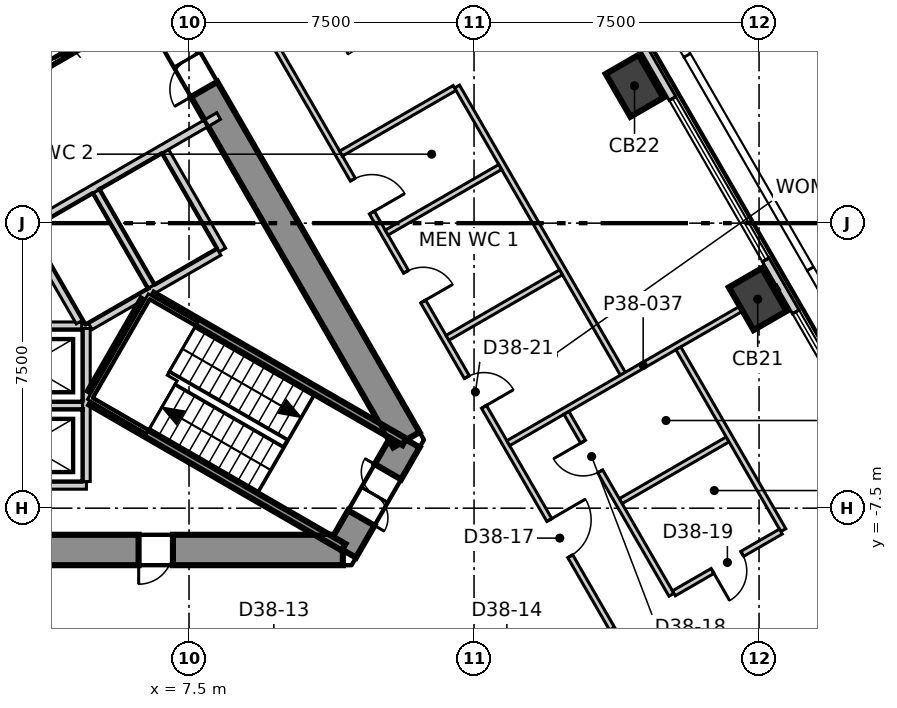
"""IFC4 building model, lengths in metres.
Left out: names, types, materials, properties, quantities, classifications, styles, units other than length and angle.
Written with IfcOpenShell. Run it as: python <this file> out.ifc"""

import sys

from ifc_helpers import new_model, si_unit, direction, frame, frame_2d, origin, origin_2d, place, context, subcontext, project, spatial, polyline, rectangle, outline, extrude, element, fill, save


model = new_model("IFC4")
c1 = context("Model", 3, precision=1e-05, world=origin(), true_north=direction((0.0, 1.0)))
c2 = subcontext(c1, "Body", "Model", "MODEL_VIEW")
j1 = project(units=[si_unit("LENGTHUNIT", "METRE"), si_unit("PLANEANGLEUNIT", "RADIAN")], contexts=[c1])
p1 = place(None, origin())
s1 = spatial("IfcSite", under=j1, at=p1, CompositionType="ELEMENT")
p2 = place(p1, origin())
s2 = spatial("IfcBuilding", under=s1, at=p2, CompositionType="ELEMENT")
p3 = place(p2, frame((0.0, 0.0, 164.3)))
s3 = spatial("IfcBuildingStorey", under=s2, at=p3, CompositionType="ELEMENT", Elevation=164.3)
p4 = place(p3, frame((-11.547, -8.6, -0.3), z_axis=(0.0, 0.0, 1.0), x_axis=(1.0, 0.0, 0.0)))
e1 = element("IfcWall", 1, at=p4, inside=s3, PredefinedType="SHEAR", context=c2, shape_type="SweptSolid", body=[
    extrude(outline(polyline([(-0.231, -0.4), (1.732, -0.4), (3.695, -0.4), (5.658, -0.4), (7.621, -0.4), (9.584, -0.4), (11.547, -0.4), (13.51, -0.4), (15.473, -0.4), (17.436, -0.4), (19.399, -0.4), (21.362, -0.4), (23.325, -0.4), (22.863, 0.4), (20.977, 0.4), (19.091, 0.4), (17.205, 0.4), (15.319, 0.4), (13.433, 0.4), (11.547, 0.4), (9.661, 0.4), (7.775, 0.4), (5.889, 0.4), (4.003, 0.4), (2.117, 0.4), (0.231, 0.4), (-0.231, -0.4)])), origin(), (0.0, 0.0, 1.0), 4.0),
])
p5 = place(p4, frame((3.34, 0.0, 0.3)))
e2 = element("IfcOpeningElement", 2, at=p5, cuts=e1, PredefinedType="OPENING", context=c2, shape_type="SweptSolid", body=[
    extrude(rectangle(XDim=0.9, YDim=2.1, at=frame_2d((0.45, 1.05))), frame((0.0, 0.41, 0.0), z_axis=(0.0, -1.0, 0.0), x_axis=(1.0, 0.0, 0.0)), (0.0, 0.0, 1.0), 0.82),
])
p6 = place(p4, frame((17.722, 0.0, 0.3)))
e3 = element("IfcOpeningElement", 3, at=p6, cuts=e1, PredefinedType="OPENING", context=c2, shape_type="SweptSolid", body=[
    extrude(rectangle(XDim=0.9, YDim=2.1, at=frame_2d((0.45, 1.05))), frame((0.0, 0.41, 0.0), z_axis=(0.0, -1.0, 0.0), x_axis=(1.0, 0.0, 0.0)), (0.0, 0.0, 1.0), 0.82),
])
p7 = place(p3, frame((11.547, -8.6, -0.3), z_axis=(0.0, 0.0, 1.0), x_axis=(0.49987182685, 0.866099391942, 0.0)))
e4 = element("IfcWall", 4, at=p7, inside=s3, PredefinedType="SHEAR", context=c2, shape_type="SweptSolid", body=[
    extrude(outline(polyline([(-0.231, -0.4), (1.674, -0.4), (3.579, -0.4), (3.118, 0.4), (1.674, 0.4), (0.231, 0.4), (-0.231, -0.4)])), origin(), (0.0, 0.0, 1.0), 4.0),
])
p8 = place(p7, frame((0.974, 0.0, 0.3)))
e5 = element("IfcOpeningElement", 5, at=p8, cuts=e4, PredefinedType="OPENING", context=c2, shape_type="SweptSolid", body=[
    extrude(rectangle(XDim=1.4, YDim=2.1, at=frame_2d((0.7, 1.05))), frame((0.0, 0.41, 0.0), z_axis=(0.0, -1.0, 0.0), x_axis=(1.0, 0.0, 0.0)), (0.0, 0.0, 1.0), 0.82),
])
p9 = place(p3, frame((13.221, -5.7, -0.3), z_axis=(0.0, 0.0, 1.0), x_axis=(-0.499995765644, 0.866027848477, 0.0)))
e6 = element("IfcWall", 6, at=p9, inside=s3, PredefinedType="SHEAR", context=c2, shape_type="SweptSolid", body=[
    extrude(outline(polyline([(-0.231, -0.4), (1.732, -0.4), (3.695, -0.4), (5.658, -0.4), (7.621, -0.4), (9.584, -0.4), (11.547, -0.4), (13.51, -0.4), (15.473, -0.4), (17.436, -0.4), (19.399, -0.4), (21.362, -0.4), (23.325, -0.4), (22.863, 0.4), (20.977, 0.4), (19.091, 0.4), (17.205, 0.4), (15.319, 0.4), (13.433, 0.4), (11.547, 0.4), (9.661, 0.4), (7.775, 0.4), (5.889, 0.4), (4.003, 0.4), (2.117, 0.4), (0.231, 0.4), (-0.231, -0.4)])), origin(), (0.0, 0.0, 1.0), 4.0),
])
p10 = place(p9, frame((10.647, 0.0, 0.3)))
e7 = element("IfcOpeningElement", 7, at=p10, cuts=e6, PredefinedType="OPENING", context=c2, shape_type="SweptSolid", body=[
    extrude(rectangle(XDim=1.8, YDim=2.1, at=frame_2d((0.9, 1.05))), frame((0.0, 0.41, 0.0), z_axis=(0.0, -1.0, 0.0), x_axis=(1.0, 0.0, 0.0)), (0.0, 0.0, 1.0), 0.82),
])
p11 = place(p9, frame((17.671, 0.0, 0.3)))
e8 = element("IfcOpeningElement", 8, at=p11, cuts=e6, PredefinedType="OPENING", context=c2, shape_type="SweptSolid", body=[
    extrude(rectangle(XDim=1.0, YDim=2.1, at=frame_2d((0.5, 1.05))), frame((0.0, 0.41, 0.0), z_axis=(0.0, -1.0, 0.0), x_axis=(1.0, 0.0, 0.0)), (0.0, 0.0, 1.0), 0.82),
])
for number, where, z_axis, x_axis in (
    (9, (22.464, -2.001, -0.3), (0.0, 0.0, 1.0), (-0.5, 0.866, 0.0)),
    (10, (19.223, 3.613, -0.3), (0.0, 0.0, 1.0), (-0.5, 0.866, 0.0)),
):
    element("IfcColumn", number, at=place(p3, frame(where, z_axis=z_axis, x_axis=x_axis)), inside=s3, PredefinedType="COLUMN", context=c2, shape_type="SweptSolid", body=[
        extrude(rectangle(XDim=1.3, YDim=1.0, at=origin_2d()), origin(), (0.0, 0.0, 1.0), 4.0),
    ])
p12 = place(p3, frame((30.204, -14.006, 0.0), z_axis=(0.0, 0.0, 1.0), x_axis=(-0.500008017777, 0.866020774669, 0.0)))
e11 = element("IfcWall", 11, at=p12, inside=s3, PredefinedType="ELEMENTEDWALL", context=c2, shape_type="SweptSolid", body=[
    extrude(rectangle(XDim=54.443, YDim=0.2, at=frame_2d((27.222, 0.0))), origin(), (0.0, 0.0, 1.0), 3.7),
])
p13 = place(p12, frame((2.094, 0.0, 0.9)))
e12 = element("IfcOpeningElement", 12, at=p13, cuts=e11, PredefinedType="OPENING", context=c2, shape_type="SweptSolid", body=[
    extrude(rectangle(XDim=4.9, YDim=2.5, at=frame_2d((2.45, 1.25))), frame((0.0, 0.11, 0.0), z_axis=(0.0, -1.0, 0.0), x_axis=(1.0, 0.0, 0.0)), (0.0, 0.0, 1.0), 0.22),
])
p14 = place(p12, frame((8.576, 0.0, 0.9)))
e13 = element("IfcOpeningElement", 13, at=p14, cuts=e11, PredefinedType="OPENING", context=c2, shape_type="SweptSolid", body=[
    extrude(rectangle(XDim=4.9, YDim=2.5, at=frame_2d((2.45, 1.25))), frame((0.0, 0.11, 0.0), z_axis=(0.0, -1.0, 0.0), x_axis=(1.0, 0.0, 0.0)), (0.0, 0.0, 1.0), 0.22),
])
p15 = place(p12, frame((15.058, 0.0, 0.9)))
e14 = element("IfcOpeningElement", 14, at=p15, cuts=e11, PredefinedType="OPENING", context=c2, shape_type="SweptSolid", body=[
    extrude(rectangle(XDim=4.9, YDim=2.5, at=frame_2d((2.45, 1.25))), frame((0.0, 0.11, 0.0), z_axis=(0.0, -1.0, 0.0), x_axis=(1.0, 0.0, 0.0)), (0.0, 0.0, 1.0), 0.22),
])
p16 = place(p12, frame((21.54, 0.0, 0.9)))
e15 = element("IfcOpeningElement", 15, at=p16, cuts=e11, PredefinedType="OPENING", context=c2, shape_type="SweptSolid", body=[
    extrude(rectangle(XDim=4.9, YDim=2.5, at=frame_2d((2.45, 1.25))), frame((0.0, 0.11, 0.0), z_axis=(0.0, -1.0, 0.0), x_axis=(1.0, 0.0, 0.0)), (0.0, 0.0, 1.0), 0.22),
])
p17 = place(p12, frame((28.023, 0.0, 0.9)))
e16 = element("IfcOpeningElement", 16, at=p17, cuts=e11, PredefinedType="OPENING", context=c2, shape_type="SweptSolid", body=[
    extrude(rectangle(XDim=4.9, YDim=2.5, at=frame_2d((2.45, 1.25))), frame((0.0, 0.11, 0.0), z_axis=(0.0, -1.0, 0.0), x_axis=(1.0, 0.0, 0.0)), (0.0, 0.0, 1.0), 0.22),
])
p18 = place(p12, frame((34.505, 0.0, 0.9)))
e17 = element("IfcOpeningElement", 17, at=p18, cuts=e11, PredefinedType="OPENING", context=c2, shape_type="SweptSolid", body=[
    extrude(rectangle(XDim=4.9, YDim=2.5, at=frame_2d((2.45, 1.25))), frame((0.0, 0.11, 0.0), z_axis=(0.0, -1.0, 0.0), x_axis=(1.0, 0.0, 0.0)), (0.0, 0.0, 1.0), 0.22),
])
p19 = place(p12, frame((40.987, 0.0, 0.9)))
e18 = element("IfcOpeningElement", 18, at=p19, cuts=e11, PredefinedType="OPENING", context=c2, shape_type="SweptSolid", body=[
    extrude(rectangle(XDim=4.9, YDim=2.5, at=frame_2d((2.45, 1.25))), frame((0.0, 0.11, 0.0), z_axis=(0.0, -1.0, 0.0), x_axis=(1.0, 0.0, 0.0)), (0.0, 0.0, 1.0), 0.22),
])
p20 = place(p12, frame((47.469, 0.0, 0.9)))
e19 = element("IfcOpeningElement", 19, at=p20, cuts=e11, PredefinedType="OPENING", context=c2, shape_type="SweptSolid", body=[
    extrude(rectangle(XDim=4.9, YDim=2.5, at=frame_2d((2.45, 1.25))), frame((0.0, 0.11, 0.0), z_axis=(0.0, -1.0, 0.0), x_axis=(1.0, 0.0, 0.0)), (0.0, 0.0, 1.0), 0.22),
])
p21 = place(p3, frame((9.804, 4.62, 0.0), z_axis=(0.0, 0.0, 1.0), x_axis=(0.500000173646, -0.86602530353, 0.0)))
e20 = element("IfcWall", 20, at=p21, inside=s3, PredefinedType="PARTITIONING", context=c2, shape_type="SweptSolid", body=[
    extrude(rectangle(XDim=17.654, YDim=0.15, at=frame_2d((8.827, 0.0))), origin(), (0.0, 0.0, 1.0), 3.7),
])
p22 = place(p21, frame((14.354, 0.0, 0.0)))
e21 = element("IfcOpeningElement", 21, at=p22, cuts=e20, PredefinedType="OPENING", context=c2, shape_type="SweptSolid", body=[
    extrude(rectangle(XDim=1.1, YDim=2.1, at=frame_2d((0.55, 1.05))), frame((0.0, 0.085, 0.0), z_axis=(0.0, -1.0, 0.0), x_axis=(1.0, 0.0, 0.0)), (0.0, 0.0, 1.0), 0.17),
])
p23 = place(p21, frame((10.014, 0.0, 0.0)))
e22 = element("IfcOpeningElement", 22, at=p23, cuts=e20, PredefinedType="OPENING", context=c2, shape_type="SweptSolid", body=[
    extrude(rectangle(XDim=0.9, YDim=2.1, at=frame_2d((0.45, 1.05))), frame((0.0, 0.085, 0.0), z_axis=(0.0, -1.0, 0.0), x_axis=(1.0, 0.0, 0.0)), (0.0, 0.0, 1.0), 0.17),
])
p24 = place(p21, frame((6.814, 0.0, 0.0)))
e23 = element("IfcOpeningElement", 23, at=p24, cuts=e20, PredefinedType="OPENING", context=c2, shape_type="SweptSolid", body=[
    extrude(rectangle(XDim=0.9, YDim=2.1, at=frame_2d((0.45, 1.05))), frame((0.0, 0.085, 0.0), z_axis=(0.0, -1.0, 0.0), x_axis=(1.0, 0.0, 0.0)), (0.0, 0.0, 1.0), 0.17),
])
p25 = place(p21, frame((4.014, 0.0, 0.0)))
e24 = element("IfcOpeningElement", 24, at=p25, cuts=e20, PredefinedType="OPENING", context=c2, shape_type="SweptSolid", body=[
    extrude(rectangle(XDim=1.0, YDim=2.1, at=frame_2d((0.5, 1.05))), frame((0.0, 0.085, 0.0), z_axis=(0.0, -1.0, 0.0), x_axis=(1.0, 0.0, 0.0)), (0.0, 0.0, 1.0), 0.17),
])
p26 = place(p3, frame((14.553, 3.593, 0.0), z_axis=(0.0, 0.0, 1.0), x_axis=(0.500054279689, -0.865994063124, 0.0)))
e25 = element("IfcWall", 25, at=p26, inside=s3, PredefinedType="PARTITIONING", context=c2, shape_type="SweptSolid", body=[
    extrude(rectangle(XDim=8.725, YDim=0.15, at=frame_2d((4.363, 0.0))), origin(), (0.0, 0.0, 1.0), 3.7),
])
for number, where, z_axis, x_axis in (
    (26, (11.5, 1.831, 0.0), (0.0, 0.0, 1.0), (0.866, 0.5, 0.0)),
    (27, (12.7, -0.248, 0.0), (0.0, 0.0, 1.0), (0.866, 0.5, 0.0)),
    (28, (14.3, -3.019, 0.0), (0.0, 0.0, 1.0), (0.866, 0.5, 0.0)),
):
    element("IfcWall", number, at=place(p3, frame(where, z_axis=z_axis, x_axis=x_axis)), inside=s3, PredefinedType="PARTITIONING", context=c2, shape_type="SweptSolid", body=[
        extrude(rectangle(XDim=3.45, YDim=0.15, at=frame_2d((1.725, 0.0))), origin(), (0.0, 0.0, 1.0), 3.7),
    ])
p27 = place(p3, frame((15.9, -5.79, 0.0), z_axis=(0.0, 0.0, 1.0), x_axis=(0.866061630889, 0.499937247563, 0.0)))
e29 = element("IfcWall", 29, at=p27, inside=s3, PredefinedType="PARTITIONING", context=c2, shape_type="SweptSolid", body=[
    extrude(rectangle(XDim=8.199, YDim=0.15, at=frame_2d((4.1, 0.0))), origin(), (0.0, 0.0, 1.0), 3.7),
])
p28 = place(p3, frame((18.859, -7.315, 0.0), z_axis=(0.0, 0.0, 1.0), x_axis=(0.866071776036, 0.499919672301, 0.0)))
e30 = element("IfcWall", 30, at=p28, inside=s3, PredefinedType="PARTITIONING", context=c2, shape_type="SweptSolid", body=[
    extrude(rectangle(XDim=3.25, YDim=0.15, at=frame_2d((1.625, 0.0))), origin(), (0.0, 0.0, 1.0), 3.7),
])
p29 = place(p3, frame((20.376, -3.293, 0.0), z_axis=(0.0, 0.0, 1.0), x_axis=(0.500050108258, -0.865996471835, 0.0)))
e31 = element("IfcWall", 31, at=p29, inside=s3, PredefinedType="PARTITIONING", context=c2, shape_type="SweptSolid", body=[
    extrude(rectangle(XDim=5.525, YDim=0.15, at=frame_2d((2.763, 0.0))), origin(), (0.0, 0.0, 1.0), 3.7),
])
p30 = place(p3, frame((17.432, -4.993, 0.0), z_axis=(0.0, 0.0, 1.0), x_axis=(0.499931554694, -0.866064917094, 0.0)))
e32 = element("IfcWall", 32, at=p30, inside=s3, PredefinedType="PARTITIONING", context=c2, shape_type="SweptSolid", body=[
    extrude(rectangle(XDim=5.525, YDim=0.15, at=frame_2d((2.763, 0.0))), origin(), (0.0, 0.0, 1.0), 3.7),
])
p31 = place(p30, frame((0.875, 0.0, 0.0)))
e33 = element("IfcOpeningElement", 33, at=p31, cuts=e32, PredefinedType="OPENING", context=c2, shape_type="SweptSolid", body=[
    extrude(rectangle(XDim=0.9, YDim=2.1, at=frame_2d((0.45, 1.05))), frame((0.0, 0.085, 0.0), z_axis=(0.0, -1.0, 0.0), x_axis=(1.0, 0.0, 0.0)), (0.0, 0.0, 1.0), 0.17),
])
p32 = place(p3, frame((20.259, -9.74, 0.0), z_axis=(0.0, 0.0, 1.0), x_axis=(0.866053003207, 0.499952193351, 0.0)))
e34 = element("IfcWall", 34, at=p32, inside=s3, PredefinedType="PARTITIONING", context=c2, shape_type="SweptSolid", body=[
    extrude(rectangle(XDim=3.25, YDim=0.15, at=frame_2d((1.625, 0.0))), origin(), (0.0, 0.0, 1.0), 3.7),
])
p33 = place(p32, frame((1.175, 0.0, 0.0)))
e35 = element("IfcOpeningElement", 35, at=p33, cuts=e34, PredefinedType="OPENING", context=c2, shape_type="SweptSolid", body=[
    extrude(rectangle(XDim=0.9, YDim=2.1, at=frame_2d((0.45, 1.05))), frame((0.0, 0.085, 0.0), z_axis=(0.0, -1.0, 0.0), x_axis=(1.0, 0.0, 0.0)), (0.0, 0.0, 1.0), 0.17),
])
p34 = place(p3, frame((1.8, -6.9, 0.0), z_axis=(0.0, 0.0, 1.0), x_axis=(1.0, 0.0, 0.0)))
e36 = element("IfcWall", 36, at=p34, inside=s3, PredefinedType="SOLIDWALL", context=c2, shape_type="SweptSolid", body=[
    extrude(rectangle(XDim=3.0, YDim=0.2, at=frame_2d((1.5, 0.0))), origin(), (0.0, 0.0, 1.0), 3.7),
])
p35 = place(p3, frame((1.8, -4.8, 0.0), z_axis=(0.0, 0.0, 1.0), x_axis=(1.0, 0.0, 0.0)))
e37 = element("IfcWall", 37, at=p35, inside=s3, PredefinedType="SOLIDWALL", context=c2, shape_type="SweptSolid", body=[
    extrude(rectangle(XDim=2.9, YDim=0.2, at=frame_2d((1.45, 0.0))), origin(), (0.0, 0.0, 1.0), 3.7),
])
p36 = place(p3, frame((1.703, -2.7, 0.0), z_axis=(0.0, 0.0, 1.0), x_axis=(1.0, 0.0, 0.0)))
e38 = element("IfcWall", 38, at=p36, inside=s3, PredefinedType="SOLIDWALL", context=c2, shape_type="SweptSolid", body=[
    extrude(rectangle(XDim=2.973, YDim=0.2, at=frame_2d((1.487, 0.0))), origin(), (0.0, 0.0, 1.0), 3.7),
])
p37 = place(p36, frame((0.936, 0.0, 0.0)))
e39 = element("IfcOpeningElement", 39, at=p37, cuts=e38, PredefinedType="OPENING", context=c2, shape_type="SweptSolid", body=[
    extrude(rectangle(XDim=1.1, YDim=2.1, at=frame_2d((0.55, 1.05))), frame((0.0, 0.11, 0.0), z_axis=(0.0, -1.0, 0.0), x_axis=(1.0, 0.0, 0.0)), (0.0, 0.0, 1.0), 0.22),
])
p38 = place(p3, frame((3.19, -0.125, 0.0), z_axis=(0.0, 0.0, 1.0), x_axis=(0.499988658015, -0.866031951983, 0.0)))
e40 = element("IfcWall", 40, at=p38, inside=s3, PredefinedType="SOLIDWALL", context=c2, shape_type="SweptSolid", body=[
    extrude(rectangle(XDim=2.858, YDim=0.2, at=frame_2d((1.429, 0.0))), origin(), (0.0, 0.0, 1.0), 3.7),
])
p39 = place(p3, frame((1.577, 2.874, 0.0), z_axis=(0.0, 0.0, 1.0), x_axis=(0.866073694534, 0.499916348638, 0.0)))
e41 = element("IfcWall", 41, at=p39, inside=s3, PredefinedType="SOLIDWALL", context=c2, shape_type="SweptSolid", body=[
    extrude(rectangle(XDim=5.777, YDim=0.2, at=frame_2d((2.888, 0.0))), origin(), (0.0, 0.0, 1.0), 3.7),
])
p40 = place(p39, frame((2.497, 0.0, 0.0)))
e42 = element("IfcOpeningElement", 42, at=p40, cuts=e41, PredefinedType="OPENING", context=c2, shape_type="SweptSolid", body=[
    extrude(rectangle(XDim=1.1, YDim=2.1, at=frame_2d((0.55, 1.05))), frame((0.0, 0.11, 0.0), z_axis=(0.0, -1.0, 0.0), x_axis=(1.0, 0.0, 0.0)), (0.0, 0.0, 1.0), 0.22),
])
p41 = place(p3, frame((4.8, -6.8, 0.0), z_axis=(0.0, 0.0, 1.0), x_axis=(0.0, 1.0, 0.0)))
e43 = element("IfcWall", 43, at=p41, inside=s3, PredefinedType="SOLIDWALL", context=c2, shape_type="SweptSolid", body=[
    extrude(rectangle(XDim=4.029, YDim=0.2, at=frame_2d((2.015, 0.0))), origin(), (0.0, 0.0, 1.0), 3.7),
])
p42 = place(p3, frame((6.876, 1.891, 0.0), z_axis=(0.0, 0.0, 1.0), x_axis=(0.499990139034, -0.866031096941, 0.0)))
e44 = element("IfcWall", 44, at=p42, inside=s3, PredefinedType="SOLIDWALL", context=c2, shape_type="SweptSolid", body=[
    extrude(rectangle(XDim=3.0, YDim=0.2, at=frame_2d((1.5, 0.0))), origin(), (0.0, 0.0, 1.0), 3.7),
])
p43 = place(p3, frame((5.057, 0.841, 0.0), z_axis=(0.0, 0.0, 1.0), x_axis=(0.50012328804, -0.865954211699, 0.0)))
e45 = element("IfcWall", 45, at=p43, inside=s3, PredefinedType="SOLIDWALL", context=c2, shape_type="SweptSolid", body=[
    extrude(rectangle(XDim=2.9, YDim=0.2, at=frame_2d((1.45, 0.0))), origin(), (0.0, 0.0, 1.0), 3.7),
])
p44 = place(p3, frame((3.278, -0.071, 0.0), z_axis=(0.0, 0.0, 1.0), x_axis=(0.865929348003, 0.5001663366, 0.0)))
e46 = element("IfcWall", 46, at=p44, inside=s3, PredefinedType="SOLIDWALL", context=c2, shape_type="SweptSolid", body=[
    extrude(rectangle(XDim=5.776, YDim=0.2, at=frame_2d((2.888, 0.0))), origin(), (0.0, 0.0, 1.0), 3.7),
])
p45 = place(p3, frame((4.9, -2.714, 0.0), z_axis=(0.0, 0.0, 1.0), x_axis=(0.865992350556, 0.500057245502, 0.0)))
e47 = element("IfcWall", 47, at=p45, inside=s3, PredefinedType="SOLIDWALL", context=c2, shape_type="SweptSolid", body=[
    extrude(rectangle(XDim=3.914, YDim=0.2, at=frame_2d((1.957, 0.0))), origin(), (0.0, 0.0, 1.0), 3.7),
])
p46 = place(p3, frame((4.929, -4.693, 0.0), z_axis=(0.0, 0.0, 1.0), x_axis=(0.866005769735, -0.50003400563, 0.0)))
e48 = element("IfcWall", 48, at=p46, inside=s3, PredefinedType="SOLIDWALL", context=c2, shape_type="SweptSolid", body=[
    extrude(rectangle(XDim=7.665, YDim=0.2, at=frame_2d((3.833, 0.0))), origin(), (0.0, 0.0, 1.0), 3.7),
])
p47 = place(p3, frame((4.929, -4.462, 0.0), z_axis=(0.0, 0.0, 1.0), x_axis=(0.500200581029, 0.865909567298, 0.0)))
e49 = element("IfcWall", 49, at=p47, inside=s3, PredefinedType="SOLIDWALL", context=c2, shape_type="SweptSolid", body=[
    extrude(rectangle(XDim=2.799, YDim=0.2, at=frame_2d((1.399, 0.0))), origin(), (0.0, 0.0, 1.0), 3.7),
])
p48 = place(p3, frame((6.529, -1.922, 0.0), z_axis=(0.0, 0.0, 1.0), x_axis=(0.866060938598, -0.499938446846, 0.0)))
e50 = element("IfcWall", 50, at=p48, inside=s3, PredefinedType="SOLIDWALL", context=c2, shape_type="SweptSolid", body=[
    extrude(rectangle(XDim=7.665, YDim=0.2, at=frame_2d((3.832, 0.0))), origin(), (0.0, 0.0, 1.0), 3.7),
])
p49 = place(p14, origin())
e51 = element("IfcWindow", 51, at=p49, inside=s3, PartitioningType="SINGLE_PANEL", PredefinedType="WINDOW", context=c2, shape_type="SweptSolid", body=[
    extrude(rectangle(XDim=4.9, YDim=2.5, at=frame_2d((2.45, 1.25))), frame((0.0, 0.03, 0.0), z_axis=(0.0, -1.0, 0.0), x_axis=(1.0, 0.0, 0.0)), (0.0, 0.0, 1.0), 0.06),
])
fill(e13, e51)
p50 = place(p15, origin())
e52 = element("IfcWindow", 52, at=p50, inside=s3, PartitioningType="SINGLE_PANEL", PredefinedType="WINDOW", context=c2, shape_type="SweptSolid", body=[
    extrude(rectangle(XDim=4.9, YDim=2.5, at=frame_2d((2.45, 1.25))), frame((0.0, 0.03, 0.0), z_axis=(0.0, -1.0, 0.0), x_axis=(1.0, 0.0, 0.0)), (0.0, 0.0, 1.0), 0.06),
])
fill(e14, e52)
p51 = place(p40, origin())
e53 = element("IfcDoor", 53, at=p51, inside=s3, OperationType="SLIDING_TO_LEFT", PredefinedType="DOOR", context=c2, shape_type="SweptSolid", body=[
    extrude(rectangle(XDim=1.1, YDim=2.1, at=frame_2d((0.55, 1.05))), frame((0.0, 0.025, 0.0), z_axis=(0.0, -1.0, 0.0), x_axis=(1.0, 0.0, 0.0)), (0.0, 0.0, 1.0), 0.05),
])
fill(e42, e53)
p52 = place(p22, origin())
e54 = element("IfcDoor", 54, at=p52, inside=s3, OperationType="SINGLE_SWING_RIGHT", PredefinedType="DOOR", context=c2, shape_type="SweptSolid", body=[
    extrude(rectangle(XDim=1.1, YDim=2.1, at=frame_2d((0.55, 1.05))), frame((0.0, 0.025, 0.0), z_axis=(0.0, -1.0, 0.0), x_axis=(1.0, 0.0, 0.0)), (0.0, 0.0, 1.0), 0.05),
])
fill(e21, e54)
p53 = place(p31, origin())
e55 = element("IfcDoor", 55, at=p53, inside=s3, OperationType="SINGLE_SWING_LEFT", PredefinedType="DOOR", context=c2, shape_type="SweptSolid", body=[
    extrude(rectangle(XDim=0.9, YDim=2.1, at=frame_2d((0.45, 1.05))), frame((0.0, 0.025, 0.0), z_axis=(0.0, -1.0, 0.0), x_axis=(1.0, 0.0, 0.0)), (0.0, 0.0, 1.0), 0.05),
])
fill(e33, e55)
p54 = place(p33, origin())
e56 = element("IfcDoor", 56, at=p54, inside=s3, OperationType="SINGLE_SWING_LEFT", PredefinedType="DOOR", context=c2, shape_type="SweptSolid", body=[
    extrude(rectangle(XDim=0.9, YDim=2.1, at=frame_2d((0.45, 1.05))), frame((0.0, 0.025, 0.0), z_axis=(0.0, -1.0, 0.0), x_axis=(1.0, 0.0, 0.0)), (0.0, 0.0, 1.0), 0.05),
])
fill(e35, e56)
p55 = place(p23, origin())
e57 = element("IfcDoor", 57, at=p55, inside=s3, OperationType="SINGLE_SWING_LEFT", PredefinedType="DOOR", context=c2, shape_type="SweptSolid", body=[
    extrude(rectangle(XDim=0.9, YDim=2.1, at=frame_2d((0.45, 1.05))), frame((0.0, 0.025, 0.0), z_axis=(0.0, -1.0, 0.0), x_axis=(1.0, 0.0, 0.0)), (0.0, 0.0, 1.0), 0.05),
])
fill(e22, e57)
p56 = place(p24, origin())
e58 = element("IfcDoor", 58, at=p56, inside=s3, OperationType="SINGLE_SWING_LEFT", PredefinedType="DOOR", context=c2, shape_type="SweptSolid", body=[
    extrude(rectangle(XDim=0.9, YDim=2.1, at=frame_2d((0.45, 1.05))), frame((0.0, 0.025, 0.0), z_axis=(0.0, -1.0, 0.0), x_axis=(1.0, 0.0, 0.0)), (0.0, 0.0, 1.0), 0.05),
])
fill(e23, e58)
p57 = place(p25, origin())
e59 = element("IfcDoor", 59, at=p57, inside=s3, OperationType="SINGLE_SWING_LEFT", PredefinedType="DOOR", context=c2, shape_type="SweptSolid", body=[
    extrude(rectangle(XDim=1.0, YDim=2.1, at=frame_2d((0.5, 1.05))), frame((0.0, 0.025, 0.0), z_axis=(0.0, -1.0, 0.0), x_axis=(1.0, 0.0, 0.0)), (0.0, 0.0, 1.0), 0.05),
])
fill(e24, e59)
p58 = place(p10, origin())
e60 = element("IfcDoor", 60, at=p58, inside=s3, OperationType="DOUBLE_DOOR_SINGLE_SWING", PredefinedType="DOOR", context=c2, shape_type="SweptSolid", body=[
    extrude(rectangle(XDim=1.8, YDim=2.1, at=frame_2d((0.9, 1.05))), frame((0.0, 0.025, 0.0), z_axis=(0.0, -1.0, 0.0), x_axis=(1.0, 0.0, 0.0)), (0.0, 0.0, 1.0), 0.05),
])
fill(e7, e60)
p59 = place(p8, origin())
e61 = element("IfcDoor", 61, at=p59, inside=s3, OperationType="DOUBLE_DOOR_SINGLE_SWING", PredefinedType="DOOR", context=c2, shape_type="SweptSolid", body=[
    extrude(rectangle(XDim=1.4, YDim=2.1, at=frame_2d((0.7, 1.05))), frame((0.0, 0.025, 0.0), z_axis=(0.0, -1.0, 0.0), x_axis=(1.0, 0.0, 0.0)), (0.0, 0.0, 1.0), 0.05),
])
fill(e5, e61)
p60 = place(p6, origin())
e62 = element("IfcDoor", 62, at=p60, inside=s3, OperationType="SINGLE_SWING_LEFT", PredefinedType="DOOR", context=c2, shape_type="SweptSolid", body=[
    extrude(rectangle(XDim=0.9, YDim=2.1, at=frame_2d((0.45, 1.05))), frame((0.0, 0.025, 0.0), z_axis=(0.0, -1.0, 0.0), x_axis=(1.0, 0.0, 0.0)), (0.0, 0.0, 1.0), 0.05),
])
fill(e3, e62)
save(model, sys.argv[1])
